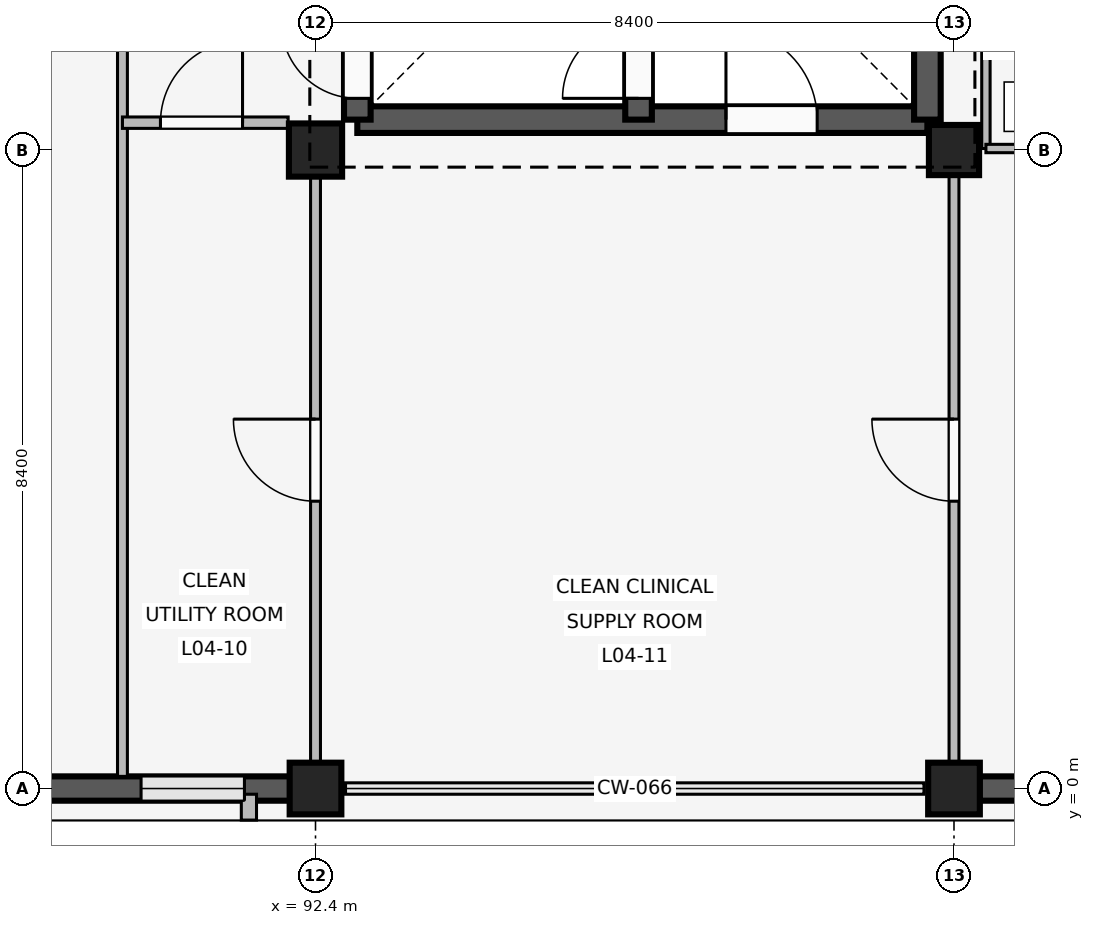
"""IFC4 building model, lengths in metres.
Left out: names, types, materials, properties, quantities, classifications, styles, units other than length and angle.
Written with IfcOpenShell. Run it as: python <this file> out.ifc"""

import sys

from ifc_helpers import new_model, si_unit, direction, frame, frame_2d, origin, origin_2d, place, context, subcontext, project, spatial, rectangle, extrude, element, fill, save


model = new_model("IFC4")
c1 = context("Model", 3, precision=1e-05, world=origin(), true_north=direction((0.0, 1.0)))
c2 = subcontext(c1, "Body", "Model", "MODEL_VIEW")
j1 = project(units=[si_unit("LENGTHUNIT", "METRE"), si_unit("PLANEANGLEUNIT", "RADIAN")], contexts=[c1])
p1 = place(None, origin())
s1 = spatial("IfcSite", under=j1, at=p1, CompositionType="ELEMENT")
p2 = place(p1, origin())
s2 = spatial("IfcBuilding", under=s1, at=p2, CompositionType="ELEMENT")
p3 = place(p2, frame((0.0, 0.0, 16.2)))
s3 = spatial("IfcBuildingStorey", under=s2, at=p3, CompositionType="ELEMENT", Elevation=16.2)
p4 = place(p3, frame((92.4, 0.0, 0.0), z_axis=(0.0, 0.0, 1.0), x_axis=(1.0, 0.0, 0.0)))
e1 = element("IfcColumn", 1, at=p4, inside=s3, PredefinedType="COLUMN", context=c2, shape_type="SweptSolid", body=[
    extrude(rectangle(XDim=0.68, YDim=0.68, at=origin_2d()), origin(), (0.0, 0.0, 1.0), 4.2),
])
p5 = place(p3, frame((92.4, 8.4, 0.0), z_axis=(0.0, 0.0, 1.0), x_axis=(1.0, 0.0, 0.0)))
e2 = element("IfcColumn", 2, at=p5, inside=s3, PredefinedType="COLUMN", context=c2, shape_type="SweptSolid", body=[
    extrude(rectangle(XDim=0.7, YDim=0.7, at=origin_2d()), origin(), (0.0, 0.0, 1.0), 4.2),
])
p6 = place(p3, frame((100.8, 0.0, 0.0), z_axis=(0.0, 0.0, 1.0), x_axis=(1.0, 0.0, 0.0)))
e3 = element("IfcColumn", 3, at=p6, inside=s3, PredefinedType="COLUMN", context=c2, shape_type="SweptSolid", body=[
    extrude(rectangle(XDim=0.68, YDim=0.68, at=origin_2d()), origin(), (0.0, 0.0, 1.0), 4.2),
])
p7 = place(p3, frame((100.8, 8.4, 0.0), z_axis=(0.0, 0.0, 1.0), x_axis=(1.0, 0.0, 0.0)))
e4 = element("IfcColumn", 4, at=p7, inside=s3, PredefinedType="COLUMN", context=c2, shape_type="SweptSolid", body=[
    extrude(rectangle(XDim=0.66, YDim=0.66, at=origin_2d()), origin(), (0.0, 0.0, 1.0), 4.2),
])
p8 = place(p3, frame((92.065, 0.0, 0.0), z_axis=(0.0, 0.0, 1.0), x_axis=(-1.0, 0.0, 0.0)))
e5 = element("IfcWall", 5, at=p8, inside=s3, PredefinedType="SOLIDWALL", context=c2, shape_type="SweptSolid", body=[
    extrude(rectangle(XDim=7.73, YDim=0.32, at=frame_2d((3.865, 0.0))), origin(), (0.0, 0.0, 1.0), 3.32),
])
p9 = place(p8, frame((0.6, 0.0, 0.85)))
e6 = element("IfcOpeningElement", 6, at=p9, cuts=e5, PredefinedType="OPENING", context=c2, shape_type="SweptSolid", body=[
    extrude(rectangle(XDim=1.36, YDim=1.42, at=frame_2d((0.68, 0.71))), frame((0.0, 0.17, 0.0), z_axis=(0.0, -1.0, 0.0), x_axis=(1.0, 0.0, 0.0)), (0.0, 0.0, 1.0), 0.34),
])
p10 = place(p8, frame((5.272, 0.0, 0.85)))
e7 = element("IfcOpeningElement", 7, at=p10, cuts=e5, PredefinedType="OPENING", context=c2, shape_type="SweptSolid", body=[
    extrude(rectangle(XDim=1.36, YDim=1.42, at=frame_2d((0.68, 0.71))), frame((0.0, 0.17, 0.0), z_axis=(0.0, -1.0, 0.0), x_axis=(1.0, 0.0, 0.0)), (0.0, 0.0, 1.0), 0.34),
])
p11 = place(p3, frame((91.524, -0.075, 0.0), z_axis=(0.0, 0.0, 1.0), x_axis=(0.0, -1.0, 0.0)))
e8 = element("IfcWall", 8, at=p11, inside=s3, PredefinedType="ELEMENTEDWALL", context=c2, shape_type="SweptSolid", body=[
    extrude(rectangle(XDim=0.34, YDim=0.2, at=frame_2d((0.17, 0.0))), origin(), (0.0, 0.0, 1.0), 3.3),
])
p12 = place(p3, frame((108.865, 0.0, 0.0), z_axis=(0.0, 0.0, 1.0), x_axis=(-1.0, 0.0, 0.0)))
e9 = element("IfcWall", 9, at=p12, inside=s3, PredefinedType="SOLIDWALL", context=c2, shape_type="SweptSolid", body=[
    extrude(rectangle(XDim=7.73, YDim=0.32, at=frame_2d((3.865, 0.0))), origin(), (0.0, 0.0, 1.0), 3.32),
])
p13 = place(p12, frame((1.158, 0.0, 0.85)))
e10 = element("IfcOpeningElement", 10, at=p13, cuts=e9, PredefinedType="OPENING", context=c2, shape_type="SweptSolid", body=[
    extrude(rectangle(XDim=1.24, YDim=1.34, at=frame_2d((0.62, 0.67))), frame((0.0, 0.17, 0.0), z_axis=(0.0, -1.0, 0.0), x_axis=(1.0, 0.0, 0.0)), (0.0, 0.0, 1.0), 0.34),
])
p14 = place(p12, frame((5.332, 0.0, 0.85)))
e11 = element("IfcOpeningElement", 11, at=p14, cuts=e9, PredefinedType="OPENING", context=c2, shape_type="SweptSolid", body=[
    extrude(rectangle(XDim=1.24, YDim=1.34, at=frame_2d((0.62, 0.67))), frame((0.0, 0.17, 0.0), z_axis=(0.0, -1.0, 0.0), x_axis=(1.0, 0.0, 0.0)), (0.0, 0.0, 1.0), 0.34),
])
p15 = place(p3, frame((92.95, 8.8, 0.0), z_axis=(0.0, 0.0, 1.0), x_axis=(1.0, 0.0, 0.0)))
e12 = element("IfcWall", 12, at=p15, inside=s3, PredefinedType="SHEAR", context=c2, shape_type="SweptSolid", body=[
    extrude(rectangle(XDim=7.5, YDim=0.35, at=frame_2d((3.75, 0.0))), origin(), (0.0, 0.0, 1.0), 3.92),
])
p16 = place(p15, frame((4.85, 0.0, 0.0)))
e13 = element("IfcOpeningElement", 13, at=p16, cuts=e12, PredefinedType="OPENING", context=c2, shape_type="SweptSolid", body=[
    extrude(rectangle(XDim=1.2, YDim=2.2, at=frame_2d((0.6, 1.1))), frame((0.0, 0.185, 0.0), z_axis=(0.0, -1.0, 0.0), x_axis=(1.0, 0.0, 0.0)), (0.0, 0.0, 1.0), 0.37),
])
p17 = place(p3, frame((92.95, 8.8, 0.0), z_axis=(0.0, 0.0, 1.0), x_axis=(0.0, 1.0, 0.0)))
e14 = element("IfcWall", 14, at=p17, inside=s3, PredefinedType="SHEAR", context=c2, shape_type="SweptSolid", body=[
    extrude(rectangle(XDim=7.55, YDim=0.35, at=frame_2d((3.775, 0.0))), origin(), (0.0, 0.0, 1.0), 3.92),
])
p18 = place(p17, frame((0.28, 0.0, 0.0)))
e15 = element("IfcOpeningElement", 15, at=p18, cuts=e14, PredefinedType="OPENING", context=c2, shape_type="SweptSolid", body=[
    extrude(rectangle(XDim=1.0, YDim=2.15, at=frame_2d((0.5, 1.075))), frame((0.0, 0.185, 0.0), z_axis=(0.0, -1.0, 0.0), x_axis=(1.0, 0.0, 0.0)), (0.0, 0.0, 1.0), 0.37),
])
p19 = place(p3, frame((100.45, 8.8, 0.0), z_axis=(0.0, 0.0, 1.0), x_axis=(0.0, 1.0, 0.0)))
e16 = element("IfcWall", 16, at=p19, inside=s3, PredefinedType="SHEAR", context=c2, shape_type="SweptSolid", body=[
    extrude(rectangle(XDim=7.55, YDim=0.35, at=frame_2d((3.775, 0.0))), origin(), (0.0, 0.0, 1.0), 3.92),
])
p20 = place(p19, frame((2.4, 0.0, 0.0)))
e17 = element("IfcOpeningElement", 17, at=p20, cuts=e16, PredefinedType="OPENING", context=c2, shape_type="SweptSolid", body=[
    extrude(rectangle(XDim=1.2, YDim=2.2, at=frame_2d((0.6, 1.1))), frame((0.0, 0.185, 0.0), z_axis=(0.0, -1.0, 0.0), x_axis=(1.0, 0.0, 0.0)), (0.0, 0.0, 1.0), 0.37),
])
p21 = place(p3, frame((96.65, 8.8, 0.0), z_axis=(0.0, 0.0, 1.0), x_axis=(0.0, 1.0, 0.0)))
e18 = element("IfcWall", 18, at=p21, inside=s3, PredefinedType="SHEAR", context=c2, shape_type="SweptSolid", body=[
    extrude(rectangle(XDim=7.55, YDim=0.35, at=frame_2d((3.775, 0.0))), origin(), (0.0, 0.0, 1.0), 3.92),
])
p22 = place(p21, frame((0.28, 0.0, 0.0)))
e19 = element("IfcOpeningElement", 19, at=p22, cuts=e18, PredefinedType="OPENING", context=c2, shape_type="SweptSolid", body=[
    extrude(rectangle(XDim=1.0, YDim=2.15, at=frame_2d((0.5, 1.075))), frame((0.0, 0.185, 0.0), z_axis=(0.0, -1.0, 0.0), x_axis=(1.0, 0.0, 0.0)), (0.0, 0.0, 1.0), 0.37),
])
p23 = place(p3, frame((89.86, 0.16, 0.0), z_axis=(0.0, 0.0, 1.0), x_axis=(0.0, 1.0, 0.0)))
e20 = element("IfcWall", 20, at=p23, inside=s3, PredefinedType="PARTITIONING", context=c2, shape_type="SweptSolid", body=[
    extrude(rectangle(XDim=10.94, YDim=0.13, at=frame_2d((5.47, 0.0))), origin(), (0.0, 0.0, 1.0), 3.3),
])
p24 = place(p3, frame((89.86, 8.76, 0.0), z_axis=(0.0, 0.0, 1.0), x_axis=(1.0, 0.0, 0.0)))
e21 = element("IfcWall", 21, at=p24, inside=s3, PredefinedType="PARTITIONING", context=c2, shape_type="SweptSolid", body=[
    extrude(rectangle(XDim=2.18, YDim=0.15, at=frame_2d((1.09, 0.0))), origin(), (0.0, 0.0, 1.0), 3.3),
])
p25 = place(p24, frame((0.5, 0.0, 0.0)))
e22 = element("IfcOpeningElement", 22, at=p25, cuts=e21, PredefinedType="OPENING", context=c2, shape_type="SweptSolid", body=[
    extrude(rectangle(XDim=1.08, YDim=2.15, at=frame_2d((0.54, 1.075))), frame((0.0, 0.085, 0.0), z_axis=(0.0, -1.0, 0.0), x_axis=(1.0, 0.0, 0.0)), (0.0, 0.0, 1.0), 0.17),
])
p26 = place(p3, frame((92.4, 0.14, 0.0), z_axis=(0.0, 0.0, 1.0), x_axis=(0.0, 1.0, 0.0)))
e23 = element("IfcWall", 23, at=p26, inside=s3, PredefinedType="PARTITIONING", context=c2, shape_type="SweptSolid", body=[
    extrude(rectangle(XDim=8.21, YDim=0.13, at=frame_2d((4.105, 0.0))), origin(), (0.0, 0.0, 1.0), 3.3),
])
p27 = place(p26, frame((3.64, 0.0, 0.0)))
e24 = element("IfcOpeningElement", 24, at=p27, cuts=e23, PredefinedType="OPENING", context=c2, shape_type="SweptSolid", body=[
    extrude(rectangle(XDim=1.08, YDim=2.15, at=frame_2d((0.54, 1.075))), frame((0.0, 0.075, 0.0), z_axis=(0.0, -1.0, 0.0), x_axis=(1.0, 0.0, 0.0)), (0.0, 0.0, 1.0), 0.15),
])
p28 = place(p3, frame((100.8, 0.14, 0.0), z_axis=(0.0, 0.0, 1.0), x_axis=(0.0, 1.0, 0.0)))
e25 = element("IfcWall", 25, at=p28, inside=s3, PredefinedType="PARTITIONING", context=c2, shape_type="SweptSolid", body=[
    extrude(rectangle(XDim=8.21, YDim=0.13, at=frame_2d((4.105, 0.0))), origin(), (0.0, 0.0, 1.0), 3.3),
])
p29 = place(p28, frame((3.64, 0.0, 0.0)))
e26 = element("IfcOpeningElement", 26, at=p29, cuts=e25, PredefinedType="OPENING", context=c2, shape_type="SweptSolid", body=[
    extrude(rectangle(XDim=1.08, YDim=2.15, at=frame_2d((0.54, 1.075))), frame((0.0, 0.075, 0.0), z_axis=(0.0, -1.0, 0.0), x_axis=(1.0, 0.0, 0.0)), (0.0, 0.0, 1.0), 0.15),
])
p30 = place(p3, frame((101.22, 8.42, 0.0), z_axis=(0.0, 0.0, 1.0), x_axis=(0.0, 1.0, 0.0)))
e27 = element("IfcWall", 27, at=p30, inside=s3, PredefinedType="PARTITIONING", context=c2, shape_type="SweptSolid", body=[
    extrude(rectangle(XDim=2.61, YDim=0.11, at=frame_2d((1.305, 0.0))), origin(), (0.0, 0.0, 1.0), 3.3),
])
p31 = place(p3, frame((101.22, 8.42, 0.0), z_axis=(0.0, 0.0, 1.0), x_axis=(1.0, 0.0, 0.0)))
e28 = element("IfcWall", 28, at=p31, inside=s3, PredefinedType="PARTITIONING", context=c2, shape_type="SweptSolid", body=[
    extrude(rectangle(XDim=1.98, YDim=0.11, at=frame_2d((0.99, 0.0))), origin(), (0.0, 0.0, 1.0), 3.3),
])
p32 = place(p31, frame((0.54, 0.0, 0.0)))
e29 = element("IfcOpeningElement", 29, at=p32, cuts=e28, PredefinedType="OPENING", context=c2, shape_type="SweptSolid", body=[
    extrude(rectangle(XDim=0.9, YDim=2.1, at=frame_2d((0.45, 1.05))), frame((0.0, 0.065, 0.0), z_axis=(0.0, -1.0, 0.0), x_axis=(1.0, 0.0, 0.0)), (0.0, 0.0, 1.0), 0.13),
])
p33 = place(p9, origin())
e30 = element("IfcWindow", 30, at=p33, inside=s3, PartitioningType="SINGLE_PANEL", PredefinedType="WINDOW", context=c2, shape_type="SweptSolid", body=[
    extrude(rectangle(XDim=1.36, YDim=1.42, at=frame_2d((0.68, 0.71))), frame((0.0, 0.03, 0.0), z_axis=(0.0, -1.0, 0.0), x_axis=(1.0, 0.0, 0.0)), (0.0, 0.0, 1.0), 0.06),
])
fill(e6, e30)
p34 = place(p16, origin())
e31 = element("IfcDoor", 31, at=p34, inside=s3, OperationType="SINGLE_SWING_LEFT", PredefinedType="DOOR", context=c2, shape_type="SweptSolid", body=[
    extrude(rectangle(XDim=1.2, YDim=2.2, at=frame_2d((0.6, 1.1))), frame((0.0, 0.025, 0.0), z_axis=(0.0, -1.0, 0.0), x_axis=(1.0, 0.0, 0.0)), (0.0, 0.0, 1.0), 0.05),
])
fill(e13, e31)
p35 = place(p18, origin())
e32 = element("IfcDoor", 32, at=p35, inside=s3, OperationType="SINGLE_SWING_RIGHT", PredefinedType="DOOR", context=c2, shape_type="SweptSolid", body=[
    extrude(rectangle(XDim=1.0, YDim=2.15, at=frame_2d((0.5, 1.075))), frame((0.0, 0.025, 0.0), z_axis=(0.0, -1.0, 0.0), x_axis=(1.0, 0.0, 0.0)), (0.0, 0.0, 1.0), 0.05),
])
fill(e15, e32)
p36 = place(p22, origin())
e33 = element("IfcDoor", 33, at=p36, inside=s3, OperationType="SINGLE_SWING_LEFT", PredefinedType="DOOR", context=c2, shape_type="SweptSolid", body=[
    extrude(rectangle(XDim=1.0, YDim=2.15, at=frame_2d((0.5, 1.075))), frame((0.0, 0.025, 0.0), z_axis=(0.0, -1.0, 0.0), x_axis=(1.0, 0.0, 0.0)), (0.0, 0.0, 1.0), 0.05),
])
fill(e19, e33)
p37 = place(p25, origin())
e34 = element("IfcDoor", 34, at=p37, inside=s3, OperationType="SINGLE_SWING_RIGHT", PredefinedType="DOOR", context=c2, shape_type="SweptSolid", body=[
    extrude(rectangle(XDim=1.08, YDim=2.15, at=frame_2d((0.54, 1.075))), frame((0.0, 0.025, 0.0), z_axis=(0.0, -1.0, 0.0), x_axis=(1.0, 0.0, 0.0)), (0.0, 0.0, 1.0), 0.05),
])
fill(e22, e34)
p38 = place(p27, origin())
e35 = element("IfcDoor", 35, at=p38, inside=s3, OperationType="SINGLE_SWING_RIGHT", PredefinedType="DOOR", context=c2, shape_type="SweptSolid", body=[
    extrude(rectangle(XDim=1.08, YDim=2.15, at=frame_2d((0.54, 1.075))), frame((0.0, 0.025, 0.0), z_axis=(0.0, -1.0, 0.0), x_axis=(1.0, 0.0, 0.0)), (0.0, 0.0, 1.0), 0.05),
])
fill(e24, e35)
p39 = place(p29, origin())
e36 = element("IfcDoor", 36, at=p39, inside=s3, OperationType="SINGLE_SWING_RIGHT", PredefinedType="DOOR", context=c2, shape_type="SweptSolid", body=[
    extrude(rectangle(XDim=1.08, YDim=2.15, at=frame_2d((0.54, 1.075))), frame((0.0, 0.025, 0.0), z_axis=(0.0, -1.0, 0.0), x_axis=(1.0, 0.0, 0.0)), (0.0, 0.0, 1.0), 0.05),
])
fill(e26, e36)
save(model, sys.argv[1])
